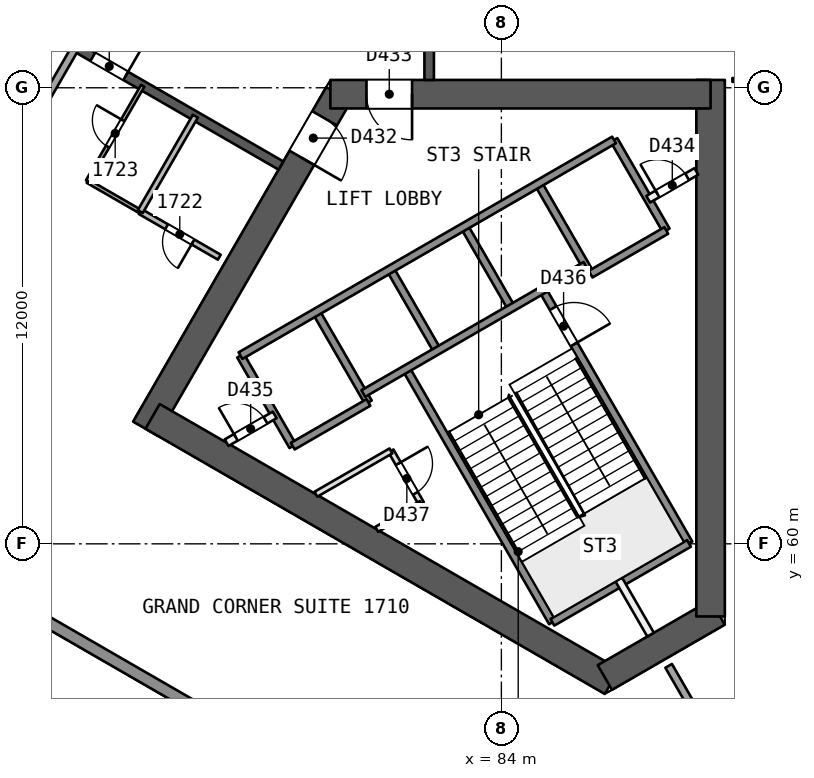
"""IFC4 building model, lengths in metres.
Left out: names, types, materials, properties, quantities, classifications, styles, units other than length and angle.
Written with IfcOpenShell. Run it as: python <this file> out.ifc"""

import sys

from ifc_helpers import new_model, si_unit, direction, frame, frame_2d, origin, place, context, subcontext, project, spatial, rectangle, extrude, element, fill, save


model = new_model("IFC4")
c1 = context("Model", 3, precision=1e-05, world=origin(), true_north=direction((0.0, 1.0)))
c2 = subcontext(c1, "Body", "Model", "MODEL_VIEW")
j1 = project(units=[si_unit("LENGTHUNIT", "METRE"), si_unit("PLANEANGLEUNIT", "RADIAN")], contexts=[c1])
p1 = place(None, origin())
s1 = spatial("IfcSite", under=j1, at=p1, CompositionType="ELEMENT")
p2 = place(p1, origin())
s2 = spatial("IfcBuilding", under=s1, at=p2, CompositionType="ELEMENT")
p3 = place(p2, frame((0.0, 0.0, 75.8)))
s3 = spatial("IfcBuildingStorey", under=s2, at=p3, CompositionType="ELEMENT", Elevation=75.8)
p4 = place(p3, frame((79.717, 71.831, 0.0), z_axis=(0.0, 0.0, 1.0), x_axis=(-0.499996230114, -0.866027580318, 0.0)))
e1 = element("IfcWall", 1, at=p4, inside=s3, PredefinedType="SHEAR", context=c2, shape_type="SweptSolid", body=[
    extrude(rectangle(XDim=10.164, YDim=0.75, at=frame_2d((5.082, 0.0))), origin(), (0.0, 0.0, 1.0), 3.7),
])
p5 = place(p4, frame((0.733, 0.0, 0.0)))
e2 = element("IfcOpeningElement", 2, at=p5, cuts=e1, PredefinedType="OPENING", context=c2, shape_type="SweptSolid", body=[
    extrude(rectangle(XDim=1.2, YDim=2.1, at=frame_2d((0.6, 1.05))), frame((0.0, 0.385, 0.0), z_axis=(0.0, -1.0, 0.0), x_axis=(1.0, 0.0, 0.0)), (0.0, 0.0, 1.0), 0.771),
])
p6 = place(p3, frame((74.822, 63.354, 0.0), z_axis=(0.0, 0.0, 1.0), x_axis=(0.8660248072, -0.500001033313, 0.0)))
e3 = element("IfcWall", 3, at=p6, inside=s3, PredefinedType="SHEAR", context=c2, shape_type="SweptSolid", body=[
    extrude(rectangle(XDim=13.958, YDim=0.75, at=frame_2d((6.979, 0.0))), origin(), (0.0, 0.0, 1.0), 3.7),
])
p7 = place(p3, frame((86.723, 56.483, 0.0), z_axis=(0.0, 0.0, 1.0), x_axis=(0.866017201164, 0.500014207086, 0.0)))
e4 = element("IfcWall", 4, at=p7, inside=s3, PredefinedType="SHEAR", context=c2, shape_type="SweptSolid", body=[
    extrude(rectangle(XDim=3.429, YDim=0.75, at=frame_2d((1.714, 0.0))), origin(), (0.0, 0.0, 1.0), 3.7),
])
p8 = place(p3, frame((89.505, 58.089, 0.0), z_axis=(0.0, 0.0, 1.0), x_axis=(0.0, 1.0, 0.0)))
e5 = element("IfcWall", 5, at=p8, inside=s3, PredefinedType="SHEAR", context=c2, shape_type="SweptSolid", body=[
    extrude(rectangle(XDim=14.117, YDim=0.75, at=frame_2d((7.059, 0.0))), origin(), (0.0, 0.0, 1.0), 3.7),
])
p9 = place(p3, frame((89.505, 71.831, 0.0), z_axis=(0.0, 0.0, 1.0), x_axis=(-1.0, 0.0, 0.0)))
e6 = element("IfcWall", 6, at=p9, inside=s3, PredefinedType="SHEAR", context=c2, shape_type="SweptSolid", body=[
    extrude(rectangle(XDim=10.005, YDim=0.75, at=frame_2d((5.002, 0.0))), origin(), (0.0, 0.0, 1.0), 3.7),
])
p10 = place(p9, frame((7.855, 0.0, 0.0)))
e7 = element("IfcOpeningElement", 7, at=p10, cuts=e6, PredefinedType="OPENING", context=c2, shape_type="SweptSolid", body=[
    extrude(rectangle(XDim=1.2, YDim=2.1, at=frame_2d((0.6, 1.05))), frame((0.0, 0.385, 0.0), z_axis=(0.0, -1.0, 0.0), x_axis=(1.0, 0.0, 0.0)), (0.0, 0.0, 1.0), 0.771),
])
p11 = place(p3, frame((82.1, 72.206, 0.0), z_axis=(0.0, 0.0, 1.0), x_axis=(0.0, 1.0, 0.0)))
e8 = element("IfcWall", 8, at=p11, inside=s3, PredefinedType="SHEAR", context=c2, shape_type="SweptSolid", body=[
    extrude(rectangle(XDim=15.588, YDim=0.25, at=frame_2d((7.794, 0.0))), origin(), (0.0, 0.0, 1.0), 3.2),
])
p12 = place(p11, frame((2.462, 0.0, 0.0)))
e9 = element("IfcOpeningElement", 9, at=p12, cuts=e8, PredefinedType="OPENING", context=c2, shape_type="SweptSolid", body=[
    extrude(rectangle(XDim=1.0, YDim=2.1, at=frame_2d((0.5, 1.05))), frame((0.0, 0.135, 0.0), z_axis=(0.0, -1.0, 0.0), x_axis=(1.0, 0.0, 0.0)), (0.0, 0.0, 1.0), 0.271),
])
p13 = place(p11, frame((6.799, 0.0, 0.0)))
e10 = element("IfcOpeningElement", 10, at=p13, cuts=e8, PredefinedType="OPENING", context=c2, shape_type="SweptSolid", body=[
    extrude(rectangle(XDim=0.9, YDim=2.1, at=frame_2d((0.45, 1.05))), frame((0.0, 0.135, 0.0), z_axis=(0.0, -1.0, 0.0), x_axis=(1.0, 0.0, 0.0)), (0.0, 0.0, 1.0), 0.271),
])
p14 = place(p11, frame((9.449, 0.0, 0.0)))
e11 = element("IfcOpeningElement", 11, at=p14, cuts=e8, PredefinedType="OPENING", context=c2, shape_type="SweptSolid", body=[
    extrude(rectangle(XDim=0.9, YDim=2.1, at=frame_2d((0.45, 1.05))), frame((0.0, 0.135, 0.0), z_axis=(0.0, -1.0, 0.0), x_axis=(1.0, 0.0, 0.0)), (0.0, 0.0, 1.0), 0.271),
])
p15 = place(p11, frame((12.906, 0.0, 0.0)))
e12 = element("IfcOpeningElement", 12, at=p15, cuts=e8, PredefinedType="OPENING", context=c2, shape_type="SweptSolid", body=[
    extrude(rectangle(XDim=1.0, YDim=2.1, at=frame_2d((0.5, 1.05))), frame((0.0, 0.135, 0.0), z_axis=(0.0, -1.0, 0.0), x_axis=(1.0, 0.0, 0.0)), (0.0, 0.0, 1.0), 0.271),
])
p16 = place(p3, frame((64.7, 77.748, 0.0), z_axis=(0.0, 0.0, 1.0), x_axis=(0.866026492143, -0.499998114903, 0.0)))
e13 = element("IfcWall", 13, at=p16, inside=s3, PredefinedType="SHEAR", context=c2, shape_type="SweptSolid", body=[
    extrude(rectangle(XDim=15.588, YDim=0.25, at=frame_2d((7.794, 0.0))), origin(), (0.0, 0.0, 1.0), 3.2),
])
p17 = place(p16, frame((2.306, 0.0, 0.0)))
e14 = element("IfcOpeningElement", 14, at=p17, cuts=e13, PredefinedType="OPENING", context=c2, shape_type="SweptSolid", body=[
    extrude(rectangle(XDim=1.0, YDim=2.1, at=frame_2d((0.5, 1.05))), frame((0.0, 0.135, 0.0), z_axis=(0.0, -1.0, 0.0), x_axis=(1.0, 0.0, 0.0)), (0.0, 0.0, 1.0), 0.271),
])
p18 = place(p16, frame((8.003, 0.0, 0.0)))
e15 = element("IfcOpeningElement", 15, at=p18, cuts=e13, PredefinedType="OPENING", context=c2, shape_type="SweptSolid", body=[
    extrude(rectangle(XDim=1.1, YDim=2.1, at=frame_2d((0.55, 1.05))), frame((0.0, 0.135, 0.0), z_axis=(0.0, -1.0, 0.0), x_axis=(1.0, 0.0, 0.0)), (0.0, 0.0, 1.0), 0.271),
])
p19 = place(p16, frame((9.871, 0.0, 0.0)))
e16 = element("IfcOpeningElement", 16, at=p19, cuts=e13, PredefinedType="OPENING", context=c2, shape_type="SweptSolid", body=[
    extrude(rectangle(XDim=1.0, YDim=2.1, at=frame_2d((0.5, 1.05))), frame((0.0, 0.135, 0.0), z_axis=(0.0, -1.0, 0.0), x_axis=(1.0, 0.0, 0.0)), (0.0, 0.0, 1.0), 0.271),
])
p20 = place(p3, frame((90.079, 72.206, 0.0), z_axis=(0.0, 0.0, 1.0), x_axis=(1.0, 0.0, 0.0)))
e17 = element("IfcWall", 17, at=p20, inside=s3, PredefinedType="PARTITIONING", context=c2, shape_type="SweptSolid", body=[
    extrude(rectangle(XDim=5.347, YDim=0.1, at=frame_2d((2.674, 0.0))), origin(), (0.0, 0.0, 1.0), 3.2),
])
p21 = place(p20, frame((2.224, 0.0, 0.0)))
e18 = element("IfcOpeningElement", 18, at=p21, cuts=e17, PredefinedType="OPENING", context=c2, shape_type="SweptSolid", body=[
    extrude(rectangle(XDim=0.9, YDim=2.1, at=frame_2d((0.45, 1.05))), frame((0.0, 0.061, 0.0), z_axis=(0.0, -1.0, 0.0), x_axis=(1.0, 0.0, 0.0)), (0.0, 0.0, 1.0), 0.121),
])
p22 = place(p3, frame((88.402, 56.789, 0.0), z_axis=(0.0, 0.0, 1.0), x_axis=(0.500000093992, -0.866025349518, 0.0)))
e19 = element("IfcWall", 19, at=p22, inside=s3, PredefinedType="PARTITIONING", context=c2, shape_type="SweptSolid", body=[
    extrude(rectangle(XDim=8.957, YDim=0.2, at=frame_2d((4.478, 0.0))), origin(), (0.0, 0.0, 1.0), 3.2),
])
p23 = place(p3, frame((66.137, 61.531, 0.0), z_axis=(0.0, 0.0, 1.0), x_axis=(0.500006843521, 0.86602145264, 0.0)))
e20 = element("IfcWall", 20, at=p23, inside=s3, PredefinedType="PARTITIONING", context=c2, shape_type="SweptSolid", body=[
    extrude(rectangle(XDim=13.326, YDim=0.2, at=frame_2d((6.663, 0.0))), origin(), (0.0, 0.0, 1.0), 3.2),
])
p24 = place(p3, frame((76.578, 67.542, 0.0), z_axis=(0.0, 0.0, 1.0), x_axis=(-0.866038271014, 0.499977712642, 0.0)))
e21 = element("IfcWall", 21, at=p24, inside=s3, PredefinedType="PARTITIONING", context=c2, shape_type="SweptSolid", body=[
    extrude(rectangle(XDim=2.401, YDim=0.15, at=frame_2d((1.2, 0.0))), origin(), (0.0, 0.0, 1.0), 3.2),
])
p25 = place(p24, frame((0.801, 0.0, 0.0)))
e22 = element("IfcOpeningElement", 22, at=p25, cuts=e21, PredefinedType="OPENING", context=c2, shape_type="SweptSolid", body=[
    extrude(rectangle(XDim=0.8, YDim=2.1, at=frame_2d((0.4, 1.05))), frame((0.0, 0.085, 0.0), z_axis=(0.0, -1.0, 0.0), x_axis=(1.0, 0.0, 0.0)), (0.0, 0.0, 1.0), 0.171),
])
p26 = place(p3, frame((74.498, 68.743, 0.0), z_axis=(0.0, 0.0, 1.0), x_axis=(-0.865989903783, 0.500061482766, 0.0)))
e23 = element("IfcWall", 23, at=p26, inside=s3, PredefinedType="PARTITIONING", context=c2, shape_type="SweptSolid", body=[
    extrude(rectangle(XDim=1.6, YDim=0.1, at=frame_2d((0.8, 0.0))), origin(), (0.0, 0.0, 1.0), 3.2),
])
p27 = place(p3, frame((73.113, 69.543, 0.0), z_axis=(0.0, 0.0, 1.0), x_axis=(0.499987231761, 0.866032775405, 0.0)))
e24 = element("IfcWall", 24, at=p27, inside=s3, PredefinedType="PARTITIONING", context=c2, shape_type="SweptSolid", body=[
    extrude(rectangle(XDim=2.9, YDim=0.1, at=frame_2d((1.45, 0.0))), origin(), (0.0, 0.0, 1.0), 3.2),
])
p28 = place(p27, frame((1.05, 0.0, 0.0)))
e25 = element("IfcOpeningElement", 25, at=p28, cuts=e24, PredefinedType="OPENING", context=c2, shape_type="SweptSolid", body=[
    extrude(rectangle(XDim=0.8, YDim=2.1, at=frame_2d((0.4, 1.05))), frame((0.0, 0.061, 0.0), z_axis=(0.0, -1.0, 0.0), x_axis=(1.0, 0.0, 0.0)), (0.0, 0.0, 1.0), 0.121),
])
p29 = place(p3, frame((75.948, 71.254, 0.0), z_axis=(0.0, 0.0, 1.0), x_axis=(-0.499987231761, -0.866032775405, 0.0)))
e26 = element("IfcWall", 26, at=p29, inside=s3, PredefinedType="PARTITIONING", context=c2, shape_type="SweptSolid", body=[
    extrude(rectangle(XDim=2.9, YDim=0.15, at=frame_2d((1.45, 0.0))), origin(), (0.0, 0.0, 1.0), 3.2),
])
p30 = place(p3, frame((90.332, 47.39, 0.0), z_axis=(0.0, 0.0, 1.0), x_axis=(-0.866024586246, 0.500001416016, 0.0)))
e27 = element("IfcWall", 27, at=p30, inside=s3, PredefinedType="SOLIDWALL", context=c2, shape_type="SweptSolid", body=[
    extrude(rectangle(XDim=59.166, YDim=0.3, at=frame_2d((29.583, 0.0))), origin(), (0.0, 0.0, 1.0), 3.2),
])
p31 = place(p30, frame((28.695, 0.0, 0.0)))
e28 = element("IfcOpeningElement", 28, at=p31, cuts=e27, PredefinedType="OPENING", context=c2, shape_type="SweptSolid", body=[
    extrude(rectangle(XDim=2.4, YDim=2.4, at=frame_2d((1.2, 1.2))), frame((0.0, 0.161, 0.0), z_axis=(0.0, -1.0, 0.0), x_axis=(1.0, 0.0, 0.0)), (0.0, 0.0, 1.0), 0.321),
])
p32 = place(p30, frame((33.372, 0.0, 0.0)))
e29 = element("IfcOpeningElement", 29, at=p32, cuts=e27, PredefinedType="OPENING", context=c2, shape_type="SweptSolid", body=[
    extrude(rectangle(XDim=2.4, YDim=2.4, at=frame_2d((1.2, 1.2))), frame((0.0, 0.161, 0.0), z_axis=(0.0, -1.0, 0.0), x_axis=(1.0, 0.0, 0.0)), (0.0, 0.0, 1.0), 0.321),
])
p33 = place(p30, frame((45.903, 0.0, 0.0)))
e30 = element("IfcOpeningElement", 30, at=p33, cuts=e27, PredefinedType="OPENING", context=c2, shape_type="SweptSolid", body=[
    extrude(rectangle(XDim=2.4, YDim=2.4, at=frame_2d((1.2, 1.2))), frame((0.0, 0.161, 0.0), z_axis=(0.0, -1.0, 0.0), x_axis=(1.0, 0.0, 0.0)), (0.0, 0.0, 1.0), 0.321),
])
p34 = place(p30, frame((12.769, 0.0, 0.0)))
e31 = element("IfcOpeningElement", 31, at=p34, cuts=e27, PredefinedType="OPENING", context=c2, shape_type="SweptSolid", body=[
    extrude(rectangle(XDim=2.4, YDim=2.4, at=frame_2d((1.2, 1.2))), frame((0.0, 0.161, 0.0), z_axis=(0.0, -1.0, 0.0), x_axis=(1.0, 0.0, 0.0)), (0.0, 0.0, 1.0), 0.321),
])
p35 = place(p3, frame((77.135, 64.952, 0.0), z_axis=(0.0, 0.0, 1.0), x_axis=(0.499996545922, -0.866027397988, 0.0)))
e32 = element("IfcWall", 32, at=p35, inside=s3, PredefinedType="SOLIDWALL", context=c2, shape_type="SweptSolid", body=[
    extrude(rectangle(XDim=2.75, YDim=0.2, at=frame_2d((1.375, 0.0))), origin(), (0.0, 0.0, 1.0), 3.2),
])
p36 = place(p3, frame((81.094, 62.445, 0.0), z_axis=(0.0, 0.0, 1.0), x_axis=(0.499880961361, -0.866094119867, 0.0)))
e33 = element("IfcWall", 33, at=p36, inside=s3, PredefinedType="PARTITIONING", context=c2, shape_type="SweptSolid", body=[
    extrude(rectangle(XDim=1.6, YDim=0.15, at=frame_2d((0.8, 0.0))), origin(), (0.0, 0.0, 1.0), 3.2),
])
p37 = place(p36, frame((0.387, 0.0, 0.0)))
e34 = element("IfcOpeningElement", 34, at=p37, cuts=e33, PredefinedType="OPENING", context=c2, shape_type="SweptSolid", body=[
    extrude(rectangle(XDim=0.9, YDim=2.1, at=frame_2d((0.45, 1.05))), frame((0.0, 0.085, 0.0), z_axis=(0.0, -1.0, 0.0), x_axis=(1.0, 0.0, 0.0)), (0.0, 0.0, 1.0), 0.171),
])
p38 = place(p3, frame((79.127, 66.102, 0.0), z_axis=(0.0, 0.0, 1.0), x_axis=(0.499996545922, -0.866027397988, 0.0)))
e35 = element("IfcWall", 35, at=p38, inside=s3, PredefinedType="SOLIDWALL", context=c2, shape_type="SweptSolid", body=[
    extrude(rectangle(XDim=2.75, YDim=0.2, at=frame_2d((1.375, 0.0))), origin(), (0.0, 0.0, 1.0), 3.2),
])
p39 = place(p3, frame((81.493, 64.604, 0.0), z_axis=(0.0, 0.0, 1.0), x_axis=(0.500006057782, -0.866021906294, 0.0)))
e36 = element("IfcWall", 36, at=p39, inside=s3, PredefinedType="SOLIDWALL", context=c2, shape_type="SweptSolid", body=[
    extrude(rectangle(XDim=7.7, YDim=0.2, at=frame_2d((3.85, 0.0))), origin(), (0.0, 0.0, 1.0), 3.2),
])
p40 = place(p3, frame((81.076, 67.227, 0.0), z_axis=(0.0, 0.0, 1.0), x_axis=(0.50000366821, -0.866023285932, 0.0)))
e37 = element("IfcWall", 37, at=p40, inside=s3, PredefinedType="SOLIDWALL", context=c2, shape_type="SweptSolid", body=[
    extrude(rectangle(XDim=2.48, YDim=0.2, at=frame_2d((1.24, 0.0))), origin(), (0.0, 0.0, 1.0), 3.2),
])
p41 = place(p3, frame((87.09, 59.06, 0.0), z_axis=(0.0, 0.0, 1.0), x_axis=(0.499937194881, -0.866061661301, 0.0)))
e38 = element("IfcWall", 38, at=p41, inside=s3, PredefinedType="PARTITIONING", context=c2, shape_type="SweptSolid", body=[
    extrude(rectangle(XDim=1.673, YDim=0.2, at=frame_2d((0.836, 0.0))), origin(), (0.0, 0.0, 1.0), 3.2),
])
p42 = place(p3, frame((83.024, 68.352, 0.0), z_axis=(0.0, 0.0, 1.0), x_axis=(0.50000366821, -0.866023285932, 0.0)))
e39 = element("IfcWall", 39, at=p42, inside=s3, PredefinedType="SOLIDWALL", context=c2, shape_type="SweptSolid", body=[
    extrude(rectangle(XDim=2.48, YDim=0.2, at=frame_2d((1.24, 0.0))), origin(), (0.0, 0.0, 1.0), 3.2),
])
p43 = place(p3, frame((85.087, 66.679, 0.0), z_axis=(0.0, 0.0, 1.0), x_axis=(0.500019787375, -0.866013979237, 0.0)))
e40 = element("IfcWall", 40, at=p43, inside=s3, PredefinedType="SOLIDWALL", context=c2, shape_type="SweptSolid", body=[
    extrude(rectangle(XDim=7.7, YDim=0.2, at=frame_2d((3.85, 0.0))), origin(), (0.0, 0.0, 1.0), 3.2),
])
p44 = place(p43, frame((0.55, 0.0, 0.0)))
e41 = element("IfcOpeningElement", 41, at=p44, cuts=e40, PredefinedType="OPENING", context=c2, shape_type="SweptSolid", body=[
    extrude(rectangle(XDim=1.1, YDim=2.1, at=frame_2d((0.55, 1.05))), frame((0.0, 0.11, 0.0), z_axis=(0.0, -1.0, 0.0), x_axis=(1.0, 0.0, 0.0)), (0.0, 0.0, 1.0), 0.221),
])
for number, where, z_axis, x_axis in (
    (42, (84.973, 69.477, 0.0), (0.0, 0.0, 1.0), (0.5, -0.866, 0.0)),
    (43, (86.965, 70.626, 0.0), (0.0, 0.0, 1.0), (0.5, -0.866, 0.0)),
):
    element("IfcWall", number, at=place(p3, frame(where, z_axis=z_axis, x_axis=x_axis)), inside=s3, PredefinedType="SOLIDWALL", context=c2, shape_type="SweptSolid", body=[
        extrude(rectangle(XDim=2.75, YDim=0.2, at=frame_2d((1.375, 0.0))), origin(), (0.0, 0.0, 1.0), 3.2),
    ])
p45 = place(p3, frame((77.135, 64.952, 0.0), z_axis=(0.0, 0.0, 1.0), x_axis=(0.866031916153, 0.499988720078, 0.0)))
e44 = element("IfcWall", 44, at=p45, inside=s3, PredefinedType="SOLIDWALL", context=c2, shape_type="SweptSolid", body=[
    extrude(rectangle(XDim=11.35, YDim=0.2, at=frame_2d((5.675, 0.0))), origin(), (0.0, 0.0, 1.0), 3.2),
])
p46 = place(p3, frame((76.77, 62.662, 0.0), z_axis=(0.0, 0.0, 1.0), x_axis=(0.866054810376, 0.49994906283, 0.0)))
e45 = element("IfcWall", 45, at=p46, inside=s3, PredefinedType="PARTITIONING", context=c2, shape_type="SweptSolid", body=[
    extrude(rectangle(XDim=1.461, YDim=0.2, at=frame_2d((0.73, 0.0))), origin(), (0.0, 0.0, 1.0), 3.2),
])
p47 = place(p46, frame((0.281, 0.0, 0.0)))
e46 = element("IfcOpeningElement", 46, at=p47, cuts=e45, PredefinedType="OPENING", context=c2, shape_type="SweptSolid", body=[
    extrude(rectangle(XDim=0.9, YDim=2.1, at=frame_2d((0.45, 1.05))), frame((0.0, 0.11, 0.0), z_axis=(0.0, -1.0, 0.0), x_axis=(1.0, 0.0, 0.0)), (0.0, 0.0, 1.0), 0.221),
])
p48 = place(p3, frame((87.865, 69.068, 0.0), z_axis=(0.0, 0.0, 1.0), x_axis=(0.865982457891, 0.500074377092, 0.0)))
e47 = element("IfcWall", 47, at=p48, inside=s3, PredefinedType="PARTITIONING", context=c2, shape_type="SweptSolid", body=[
    extrude(rectangle(XDim=1.461, YDim=0.2, at=frame_2d((0.73, 0.0))), origin(), (0.0, 0.0, 1.0), 3.2),
])
p49 = place(p48, frame((0.281, 0.0, 0.0)))
e48 = element("IfcOpeningElement", 48, at=p49, cuts=e47, PredefinedType="OPENING", context=c2, shape_type="SweptSolid", body=[
    extrude(rectangle(XDim=0.9, YDim=2.1, at=frame_2d((0.45, 1.05))), frame((0.0, 0.11, 0.0), z_axis=(0.0, -1.0, 0.0), x_axis=(1.0, 0.0, 0.0)), (0.0, 0.0, 1.0), 0.221),
])
p50 = place(p3, frame((80.367, 63.954, 0.0), z_axis=(0.0, 0.0, 1.0), x_axis=(0.866026575979, 0.499997969693, 0.0)))
e49 = element("IfcWall", 49, at=p50, inside=s3, PredefinedType="SOLIDWALL", context=c2, shape_type="SweptSolid", body=[
    extrude(rectangle(XDim=6.75, YDim=0.2, at=frame_2d((3.375, 0.0))), origin(), (0.0, 0.0, 1.0), 3.2),
])
p51 = place(p3, frame((78.51, 62.57, 0.0), z_axis=(0.0, 0.0, 1.0), x_axis=(0.866053019151, 0.499952165731, 0.0)))
e50 = element("IfcWall", 50, at=p51, inside=s3, PredefinedType="SOLIDWALL", context=c2, shape_type="SweptSolid", body=[
    extrude(rectangle(XDim=2.3, YDim=0.2, at=frame_2d((1.15, 0.0))), origin(), (0.0, 0.0, 1.0), 3.2),
])
p52 = place(p3, frame((86.348, 67.095, 0.0), z_axis=(0.0, 0.0, 1.0), x_axis=(0.86602648383, 0.499998129301, 0.0)))
e51 = element("IfcWall", 51, at=p52, inside=s3, PredefinedType="SOLIDWALL", context=c2, shape_type="SweptSolid", body=[
    extrude(rectangle(XDim=2.3, YDim=0.2, at=frame_2d((1.15, 0.0))), origin(), (0.0, 0.0, 1.0), 3.2),
])
p53 = place(p3, frame((79.12, 61.305, 0.0), z_axis=(0.0, 0.0, 1.0), x_axis=(0.866046471269, 0.499963508271, 0.0)))
e52 = element("IfcWall", 52, at=p53, inside=s3, PredefinedType="PARTITIONING", context=c2, shape_type="SweptSolid", body=[
    extrude(rectangle(XDim=2.28, YDim=0.15, at=frame_2d((1.14, 0.0))), origin(), (0.0, 0.0, 1.0), 3.2),
])
p54 = place(p3, frame((80.72, 60.382, 0.0), z_axis=(0.0, 0.0, 1.0), x_axis=(0.866017611601, 0.500013496215, 0.0)))
e53 = element("IfcWall", 53, at=p54, inside=s3, PredefinedType="PARTITIONING", context=c2, shape_type="SweptSolid", body=[
    extrude(rectangle(XDim=1.355, YDim=0.15, at=frame_2d((0.678, 0.0))), origin(), (0.0, 0.0, 1.0), 3.2),
])
p55 = place(p3, frame((85.343, 57.935, 0.0), z_axis=(0.0, 0.0, 1.0), x_axis=(0.866004344652, 0.500036473714, 0.0)))
e54 = element("IfcWall", 54, at=p55, inside=s3, PredefinedType="SOLIDWALL", context=c2, shape_type="SweptSolid", body=[
    extrude(rectangle(XDim=4.15, YDim=0.2, at=frame_2d((2.075, 0.0))), origin(), (0.0, 0.0, 1.0), 3.2),
])
p56 = place(p25, origin())
e55 = element("IfcDoor", 55, at=p56, inside=s3, OperationType="SINGLE_SWING_LEFT", PredefinedType="NOTDEFINED", context=c2, shape_type="SweptSolid", body=[
    extrude(rectangle(XDim=0.8, YDim=2.1, at=frame_2d((0.4, 1.05))), frame((0.0, 0.025, 0.0), z_axis=(0.0, -1.0, 0.0), x_axis=(1.0, 0.0, 0.0)), (0.0, 0.0, 1.0), 0.05),
])
fill(e22, e55)
p57 = place(p28, origin())
e56 = element("IfcDoor", 56, at=p57, inside=s3, OperationType="SINGLE_SWING_RIGHT", PredefinedType="NOTDEFINED", context=c2, shape_type="SweptSolid", body=[
    extrude(rectangle(XDim=0.8, YDim=2.1, at=frame_2d((0.4, 1.05))), frame((0.0, 0.025, 0.0), z_axis=(0.0, -1.0, 0.0), x_axis=(1.0, 0.0, 0.0)), (0.0, 0.0, 1.0), 0.05),
])
fill(e25, e56)
p58 = place(p19, origin())
e57 = element("IfcDoor", 57, at=p58, inside=s3, OperationType="SINGLE_SWING_RIGHT", PredefinedType="NOTDEFINED", context=c2, shape_type="SweptSolid", body=[
    extrude(rectangle(XDim=1.0, YDim=2.1, at=frame_2d((0.5, 1.05))), frame((0.0, 0.025, 0.0), z_axis=(0.0, -1.0, 0.0), x_axis=(1.0, 0.0, 0.0)), (0.0, 0.0, 1.0), 0.05),
])
fill(e16, e57)
p59 = place(p5, origin())
e58 = element("IfcDoor", 58, at=p59, inside=s3, OperationType="SINGLE_SWING_RIGHT", PredefinedType="NOTDEFINED", context=c2, shape_type="SweptSolid", body=[
    extrude(rectangle(XDim=1.2, YDim=2.1, at=frame_2d((0.6, 1.05))), frame((0.0, 0.025, 0.0), z_axis=(0.0, -1.0, 0.0), x_axis=(1.0, 0.0, 0.0)), (0.0, 0.0, 1.0), 0.05),
])
fill(e2, e58)
p60 = place(p10, origin())
e59 = element("IfcDoor", 59, at=p60, inside=s3, OperationType="SINGLE_SWING_LEFT", PredefinedType="NOTDEFINED", context=c2, shape_type="SweptSolid", body=[
    extrude(rectangle(XDim=1.2, YDim=2.1, at=frame_2d((0.6, 1.05))), frame((0.0, 0.025, 0.0), z_axis=(0.0, -1.0, 0.0), x_axis=(1.0, 0.0, 0.0)), (0.0, 0.0, 1.0), 0.05),
])
fill(e7, e59)
p61 = place(p49, origin())
e60 = element("IfcDoor", 60, at=p61, inside=s3, OperationType="SINGLE_SWING_LEFT", PredefinedType="NOTDEFINED", context=c2, shape_type="SweptSolid", body=[
    extrude(rectangle(XDim=0.9, YDim=2.1, at=frame_2d((0.45, 1.05))), frame((0.0, 0.025, 0.0), z_axis=(0.0, -1.0, 0.0), x_axis=(1.0, 0.0, 0.0)), (0.0, 0.0, 1.0), 0.05),
])
fill(e48, e60)
p62 = place(p47, origin())
e61 = element("IfcDoor", 61, at=p62, inside=s3, OperationType="SINGLE_SWING_LEFT", PredefinedType="NOTDEFINED", context=c2, shape_type="SweptSolid", body=[
    extrude(rectangle(XDim=0.9, YDim=2.1, at=frame_2d((0.45, 1.05))), frame((0.0, 0.025, 0.0), z_axis=(0.0, -1.0, 0.0), x_axis=(1.0, 0.0, 0.0)), (0.0, 0.0, 1.0), 0.05),
])
fill(e46, e61)
p63 = place(p44, origin())
e62 = element("IfcDoor", 62, at=p63, inside=s3, OperationType="SINGLE_SWING_RIGHT", PredefinedType="NOTDEFINED", context=c2, shape_type="SweptSolid", body=[
    extrude(rectangle(XDim=1.1, YDim=2.1, at=frame_2d((0.55, 1.05))), frame((0.0, 0.025, 0.0), z_axis=(0.0, -1.0, 0.0), x_axis=(1.0, 0.0, 0.0)), (0.0, 0.0, 1.0), 0.05),
])
fill(e41, e62)
p64 = place(p37, origin())
e63 = element("IfcDoor", 63, at=p64, inside=s3, OperationType="SINGLE_SWING_LEFT", PredefinedType="NOTDEFINED", context=c2, shape_type="SweptSolid", body=[
    extrude(rectangle(XDim=0.9, YDim=2.1, at=frame_2d((0.45, 1.05))), frame((0.0, 0.025, 0.0), z_axis=(0.0, -1.0, 0.0), x_axis=(1.0, 0.0, 0.0)), (0.0, 0.0, 1.0), 0.05),
])
fill(e34, e63)
save(model, sys.argv[1])
